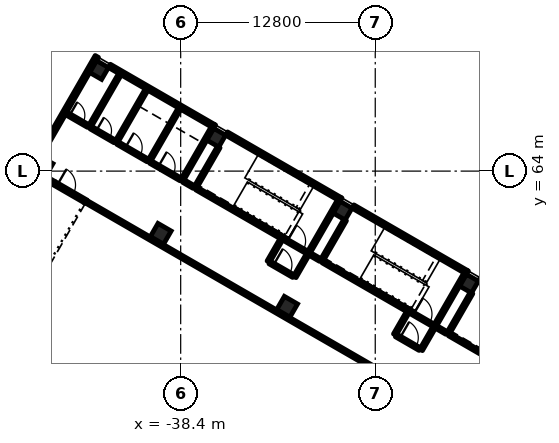
"""IFC4 building model, lengths in metres.
Left out: names, types, materials, properties, quantities, classifications, styles, units other than length and angle.
Written with IfcOpenShell. Run it as: python <this file> out.ifc"""

import sys

from ifc_helpers import new_model, si_unit, direction, frame, frame_2d, origin, origin_2d, place, context, subcontext, project, spatial, rectangle, extrude, element, fill, save


model = new_model("IFC4")
c1 = context("Model", 3, precision=1e-05, world=origin(), true_north=direction((0.0, 1.0)))
c2 = subcontext(c1, "Body", "Model", "MODEL_VIEW")
j1 = project(units=[si_unit("LENGTHUNIT", "METRE"), si_unit("PLANEANGLEUNIT", "RADIAN")], contexts=[c1])
p1 = place(None, origin())
s1 = spatial("IfcSite", under=j1, at=p1, CompositionType="ELEMENT")
p2 = place(p1, origin())
s2 = spatial("IfcBuilding", under=s1, at=p2, CompositionType="ELEMENT")
p3 = place(p2, frame((0.0, 0.0, 11.4)))
s3 = spatial("IfcBuildingStorey", under=s2, at=p3, CompositionType="ELEMENT", Elevation=11.4)
for number, where, z_axis, x_axis in (
    (1, (-19.432, 56.599, 0.0), (0.0, 0.0, 1.0), (-0.5, -0.866, 0.0)),
    (2, (-27.746, 61.399, 0.0), (0.0, 0.0, 1.0), (-0.5, -0.866, 0.0)),
    (3, (-36.06, 66.199, 0.0), (0.0, 0.0, 1.0), (-0.5, -0.866, 0.0)),
    (4, (-43.767, 70.649, 0.0), (0.0, 0.0, 1.0), (-0.5, -0.866, 0.0)),
):
    element("IfcColumn", number, at=place(p3, frame(where, z_axis=z_axis, x_axis=x_axis)), inside=s3, PredefinedType="COLUMN", context=c2, shape_type="SweptSolid", body=[
        extrude(rectangle(XDim=0.9, YDim=0.9, at=origin_2d()), origin(), (0.0, 0.0, 1.0), 4.8),
    ])
for number, where, z_axis, x_axis in (
    (5, (-31.396, 55.077, 0.0), (0.0, 0.0, 1.0), (-0.5, -0.866, 0.0)),
    (6, (-39.71, 59.877, 0.0), (0.0, 0.0, 1.0), (-0.5, -0.866, 0.0)),
):
    element("IfcColumn", number, at=place(p3, frame(where, z_axis=z_axis, x_axis=x_axis)), inside=s3, PredefinedType="COLUMN", context=c2, shape_type="SweptSolid", body=[
        extrude(rectangle(XDim=1.0, YDim=1.0, at=origin_2d()), origin(), (0.0, 0.0, 1.0), 4.8),
    ])
p4 = place(p3, frame((-47.417, 64.327, 0.0), z_axis=(0.0, 0.0, 1.0), x_axis=(-0.5, -0.866025403784, 0.0)))
e7 = element("IfcColumn", 7, at=p4, inside=s3, PredefinedType="COLUMN", context=c2, shape_type="SweptSolid", body=[
    extrude(rectangle(XDim=0.9, YDim=0.9, at=origin_2d()), origin(), (0.0, 0.0, 1.0), 4.8),
])
p5 = place(p3, frame((-49.071, 62.612, 0.0), z_axis=(0.0, 0.0, 1.0), x_axis=(0.500001855621, 0.866024332438, 0.0)))
e8 = element("IfcWall", 8, at=p5, inside=s3, PredefinedType="SOLIDWALL", context=c2, shape_type="SweptSolid", body=[
    extrude(rectangle(XDim=10.312, YDim=0.25, at=frame_2d((5.156, 0.0))), origin(), (0.0, 0.0, 1.0), 4.5),
])
p6 = place(p3, frame((-18.755, 56.872, 0.0), z_axis=(0.0, 0.0, 1.0), x_axis=(0.866034667978, -0.499983953603, 0.0)))
e9 = element("IfcWall", 9, at=p6, inside=s3, PredefinedType="SOLIDWALL", context=c2, shape_type="SweptSolid", body=[
    extrude(rectangle(XDim=9.725, YDim=0.25, at=frame_2d((4.862, 0.0))), origin(), (0.0, 0.0, 1.0), 4.5),
])
p7 = place(p3, frame((-27.069, 61.672, 0.0), z_axis=(0.0, 0.0, 1.0), x_axis=(0.866021068297, -0.500007509209, 0.0)))
e10 = element("IfcWall", 10, at=p7, inside=s3, PredefinedType="SOLIDWALL", context=c2, shape_type="SweptSolid", body=[
    extrude(rectangle(XDim=8.6, YDim=0.25, at=frame_2d((4.3, 0.0))), origin(), (0.0, 0.0, 1.0), 4.5),
])
p8 = place(p3, frame((-35.383, 66.472, 0.0), z_axis=(0.0, 0.0, 1.0), x_axis=(0.866028165386, -0.499995216735, 0.0)))
e11 = element("IfcWall", 11, at=p8, inside=s3, PredefinedType="SOLIDWALL", context=c2, shape_type="SweptSolid", body=[
    extrude(rectangle(XDim=8.6, YDim=0.25, at=frame_2d((4.3, 0.0))), origin(), (0.0, 0.0, 1.0), 4.5),
])
p9 = place(p3, frame((-43.09, 70.922, 0.0), z_axis=(0.0, 0.0, 1.0), x_axis=(0.866026562566, -0.499997992926, 0.0)))
e12 = element("IfcWall", 12, at=p9, inside=s3, PredefinedType="SOLIDWALL", context=c2, shape_type="SweptSolid", body=[
    extrude(rectangle(XDim=7.9, YDim=0.25, at=frame_2d((3.95, 0.0))), origin(), (0.0, 0.0, 1.0), 4.5),
])
p10 = place(p3, frame((-19.621, 57.372, 0.0), z_axis=(0.0, 0.0, 1.0), x_axis=(0.867038199201, -0.4982416694, 0.0)))
e13 = element("IfcWall", 13, at=p10, inside=s3, PredefinedType="SOLIDWALL", context=c2, shape_type="SweptSolid", body=[
    extrude(rectangle(XDim=0.1, YDim=0.25, at=frame_2d((0.05, 0.0))), origin(), (0.0, 0.0, 1.0), 4.5),
])
for number, where, z_axis, x_axis in (
    (14, (-27.935, 62.172, 0.0), (0.0, 0.0, 1.0), (0.866, -0.5, 0.0)),
    (15, (-36.249, 66.972, 0.0), (0.0, 0.0, 1.0), (0.866, -0.5, 0.0)),
):
    element("IfcWall", number, at=place(p3, frame(where, z_axis=z_axis, x_axis=x_axis)), inside=s3, PredefinedType="SOLIDWALL", context=c2, shape_type="SweptSolid", body=[
        extrude(rectangle(XDim=0.1, YDim=0.25, at=frame_2d((0.05, 0.0))), origin(), (0.0, 0.0, 1.0), 4.5),
    ])
p11 = place(p3, frame((-19.267, 55.984, 0.0), z_axis=(0.0, 0.0, 1.0), x_axis=(-0.49999285859, -0.86602952684, 0.0)))
e16 = element("IfcWall", 16, at=p11, inside=s3, PredefinedType="SOLIDWALL", context=c2, shape_type="SweptSolid", body=[
    extrude(rectangle(XDim=3.1, YDim=0.2, at=frame_2d((1.55, 0.0))), origin(), (0.0, 0.0, 1.0), 4.5),
])
p12 = place(p3, frame((-19.683, 57.263, 0.0), z_axis=(0.0, 0.0, 1.0), x_axis=(-0.49999894854, -0.866026010844, 0.0)))
e17 = element("IfcWall", 17, at=p12, inside=s3, PredefinedType="SOLIDWALL", context=c2, shape_type="SweptSolid", body=[
    extrude(rectangle(XDim=4.0, YDim=0.2, at=frame_2d((2.0, 0.0))), origin(), (0.0, 0.0, 1.0), 4.5),
])
p13 = place(p3, frame((-27.581, 60.784, 0.0), z_axis=(0.0, 0.0, 1.0), x_axis=(-0.49999285859, -0.86602952684, 0.0)))
e18 = element("IfcWall", 18, at=p13, inside=s3, PredefinedType="SOLIDWALL", context=c2, shape_type="SweptSolid", body=[
    extrude(rectangle(XDim=3.1, YDim=0.2, at=frame_2d((1.55, 0.0))), origin(), (0.0, 0.0, 1.0), 4.5),
])
p14 = place(p3, frame((-27.997, 62.063, 0.0), z_axis=(0.0, 0.0, 1.0), x_axis=(-0.49999894854, -0.866026010844, 0.0)))
e19 = element("IfcWall", 19, at=p14, inside=s3, PredefinedType="SOLIDWALL", context=c2, shape_type="SweptSolid", body=[
    extrude(rectangle(XDim=4.0, YDim=0.2, at=frame_2d((2.0, 0.0))), origin(), (0.0, 0.0, 1.0), 4.5),
])
p15 = place(p3, frame((-35.895, 65.584, 0.0), z_axis=(0.0, 0.0, 1.0), x_axis=(-0.500026960575, -0.86600983753, 0.0)))
e20 = element("IfcWall", 20, at=p15, inside=s3, PredefinedType="SOLIDWALL", context=c2, shape_type="SweptSolid", body=[
    extrude(rectangle(XDim=3.1, YDim=0.2, at=frame_2d((1.55, 0.0))), origin(), (0.0, 0.0, 1.0), 4.5),
])
p16 = place(p3, frame((-14.972, 49.924, 0.0), z_axis=(0.0, 0.0, 1.0), x_axis=(-0.86601134256, 0.500024353964, 0.0)))
e21 = element("IfcWall", 21, at=p16, inside=s3, PredefinedType="SOLIDWALL", context=c2, shape_type="SweptSolid", body=[
    extrude(rectangle(XDim=6.65, YDim=0.2, at=frame_2d((3.325, 0.0))), origin(), (0.0, 0.0, 1.0), 4.5),
])
p17 = place(p3, frame((-23.285, 54.724, 0.0), z_axis=(0.0, 0.0, 1.0), x_axis=(0.866002029911, -0.500040482552, 0.0)))
e22 = element("IfcWall", 22, at=p17, inside=s3, PredefinedType="SOLIDWALL", context=c2, shape_type="SweptSolid", body=[
    extrude(rectangle(XDim=1.75, YDim=0.2, at=frame_2d((0.875, 0.0))), origin(), (0.0, 0.0, 1.0), 4.5),
])
p18 = place(p17, frame((0.25, 0.0, 0.0)))
e23 = element("IfcOpeningElement", 23, at=p18, cuts=e22, PredefinedType="OPENING", context=c2, shape_type="SweptSolid", body=[
    extrude(rectangle(XDim=1.2, YDim=2.1, at=frame_2d((0.6, 1.05))), frame((0.0, 0.11, 0.0), z_axis=(0.0, -1.0, 0.0), x_axis=(1.0, 0.0, 0.0)), (0.0, 0.0, 1.0), 0.22),
])
p19 = place(p3, frame((-23.285, 54.724, 0.0), z_axis=(0.0, 0.0, 1.0), x_axis=(-0.866027239912, 0.49999681972, 0.0)))
e24 = element("IfcWall", 24, at=p19, inside=s3, PredefinedType="SOLIDWALL", context=c2, shape_type="SweptSolid", body=[
    extrude(rectangle(XDim=6.65, YDim=0.2, at=frame_2d((3.325, 0.0))), origin(), (0.0, 0.0, 1.0), 4.5),
])
p20 = place(p3, frame((-31.599, 59.524, 0.0), z_axis=(0.0, 0.0, 1.0), x_axis=(0.866036909293, -0.499980071345, 0.0)))
e25 = element("IfcWall", 25, at=p20, inside=s3, PredefinedType="SOLIDWALL", context=c2, shape_type="SweptSolid", body=[
    extrude(rectangle(XDim=1.75, YDim=0.2, at=frame_2d((0.875, 0.0))), origin(), (0.0, 0.0, 1.0), 4.5),
])
p21 = place(p20, frame((0.25, 0.0, 0.0)))
e26 = element("IfcOpeningElement", 26, at=p21, cuts=e25, PredefinedType="OPENING", context=c2, shape_type="SweptSolid", body=[
    extrude(rectangle(XDim=1.2, YDim=2.1, at=frame_2d((0.6, 1.05))), frame((0.0, 0.11, 0.0), z_axis=(0.0, -1.0, 0.0), x_axis=(1.0, 0.0, 0.0)), (0.0, 0.0, 1.0), 0.22),
])
p22 = place(p3, frame((-31.599, 59.524, 0.0), z_axis=(0.0, 0.0, 1.0), x_axis=(-0.866027239912, 0.49999681972, 0.0)))
e27 = element("IfcWall", 27, at=p22, inside=s3, PredefinedType="SOLIDWALL", context=c2, shape_type="SweptSolid", body=[
    extrude(rectangle(XDim=6.65, YDim=0.2, at=frame_2d((3.325, 0.0))), origin(), (0.0, 0.0, 1.0), 4.5),
])
for number, where, z_axis, x_axis in (
    (28, (-36.311, 66.864, 0.0), (0.0, 0.0, 1.0), (-0.5, -0.866, 0.0)),
    (29, (-38.476, 68.114, 0.0), (0.0, 0.0, 1.0), (-0.5, -0.866, 0.0)),
    (30, (-40.641, 69.364, 0.0), (0.0, 0.0, 1.0), (-0.5, -0.866, 0.0)),
):
    element("IfcWall", number, at=place(p3, frame(where, z_axis=z_axis, x_axis=x_axis)), inside=s3, PredefinedType="SOLIDWALL", context=c2, shape_type="SweptSolid", body=[
        extrude(rectangle(XDim=4.0, YDim=0.2, at=frame_2d((2.0, 0.0))), origin(), (0.0, 0.0, 1.0), 4.5),
    ])
p23 = place(p3, frame((-40.389, 64.599, 0.0), z_axis=(0.0, 0.0, 1.0), x_axis=(0.86602648383, -0.499998129301, 0.0)))
e31 = element("IfcWall", 31, at=p23, inside=s3, PredefinedType="SOLIDWALL", context=c2, shape_type="SweptSolid", body=[
    extrude(rectangle(XDim=2.3, YDim=0.2, at=frame_2d((1.15, 0.0))), origin(), (0.0, 0.0, 1.0), 4.5),
])
p24 = place(p23, frame((0.6, 0.0, 0.0)))
e32 = element("IfcOpeningElement", 32, at=p24, cuts=e31, PredefinedType="OPENING", context=c2, shape_type="SweptSolid", body=[
    extrude(rectangle(XDim=1.1, YDim=2.1, at=frame_2d((0.55, 1.05))), frame((0.0, 0.11, 0.0), z_axis=(0.0, -1.0, 0.0), x_axis=(1.0, 0.0, 0.0)), (0.0, 0.0, 1.0), 0.22),
])
p25 = place(p3, frame((-42.554, 65.849, 0.0), z_axis=(0.0, 0.0, 1.0), x_axis=(0.86602648383, -0.499998129301, 0.0)))
e33 = element("IfcWall", 33, at=p25, inside=s3, PredefinedType="SOLIDWALL", context=c2, shape_type="SweptSolid", body=[
    extrude(rectangle(XDim=2.3, YDim=0.2, at=frame_2d((1.15, 0.0))), origin(), (0.0, 0.0, 1.0), 4.5),
])
p26 = place(p25, frame((0.6, 0.0, 0.0)))
e34 = element("IfcOpeningElement", 34, at=p26, cuts=e33, PredefinedType="OPENING", context=c2, shape_type="SweptSolid", body=[
    extrude(rectangle(XDim=1.1, YDim=2.1, at=frame_2d((0.55, 1.05))), frame((0.0, 0.11, 0.0), z_axis=(0.0, -1.0, 0.0), x_axis=(1.0, 0.0, 0.0)), (0.0, 0.0, 1.0), 0.22),
])
p27 = place(p3, frame((-21.733, 53.713, 0.0), z_axis=(0.0, 0.0, 1.0), x_axis=(-0.499892348375, -0.866087547558, 0.0)))
e35 = element("IfcWall", 35, at=p27, inside=s3, PredefinedType="PARTITIONING", context=c2, shape_type="SweptSolid", body=[
    extrude(rectangle(XDim=1.7, YDim=0.2, at=frame_2d((0.85, 0.0))), origin(), (0.0, 0.0, 1.0), 3.9),
])
p28 = place(p3, frame((-23.465, 54.713, 0.0), z_axis=(0.0, 0.0, 1.0), x_axis=(-0.500000056704, -0.866025371046, 0.0)))
e36 = element("IfcWall", 36, at=p28, inside=s3, PredefinedType="PARTITIONING", context=c2, shape_type="SweptSolid", body=[
    extrude(rectangle(XDim=1.7, YDim=0.2, at=frame_2d((0.85, 0.0))), origin(), (0.0, 0.0, 1.0), 3.9),
])
for number, where, z_axis, x_axis in (
    (37, (-30.047, 58.513, 0.0), (0.0, 0.0, 1.0), (-0.5, -0.866, 0.0)),
    (38, (-31.779, 59.513, 0.0), (0.0, 0.0, 1.0), (-0.5, -0.866, 0.0)),
):
    element("IfcWall", number, at=place(p3, frame(where, z_axis=z_axis, x_axis=x_axis)), inside=s3, PredefinedType="PARTITIONING", context=c2, shape_type="SweptSolid", body=[
        extrude(rectangle(XDim=1.7, YDim=0.2, at=frame_2d((0.85, 0.0))), origin(), (0.0, 0.0, 1.0), 3.9),
    ])
p29 = place(p3, frame((-24.229, 53.19, 0.0), z_axis=(0.0, 0.0, 1.0), x_axis=(0.866047807691, -0.499961193289, 0.0)))
e39 = element("IfcWall", 39, at=p29, inside=s3, PredefinedType="PARTITIONING", context=c2, shape_type="SweptSolid", body=[
    extrude(rectangle(XDim=1.8, YDim=0.2, at=frame_2d((0.9, 0.0))), origin(), (0.0, 0.0, 1.0), 3.9),
])
p30 = place(p29, frame((0.3, 0.0, 0.0)))
e40 = element("IfcOpeningElement", 40, at=p30, cuts=e39, PredefinedType="OPENING", context=c2, shape_type="SweptSolid", body=[
    extrude(rectangle(XDim=1.2, YDim=2.1, at=frame_2d((0.6, 1.05))), frame((0.0, 0.11, 0.0), z_axis=(0.0, -1.0, 0.0), x_axis=(1.0, 0.0, 0.0)), (0.0, 0.0, 1.0), 0.22),
])
p31 = place(p3, frame((-32.542, 57.99, 0.0), z_axis=(0.0, 0.0, 1.0), x_axis=(0.866047807691, -0.499961193289, 0.0)))
e41 = element("IfcWall", 41, at=p31, inside=s3, PredefinedType="PARTITIONING", context=c2, shape_type="SweptSolid", body=[
    extrude(rectangle(XDim=1.8, YDim=0.2, at=frame_2d((0.9, 0.0))), origin(), (0.0, 0.0, 1.0), 3.9),
])
p32 = place(p31, frame((0.3, 0.0, 0.0)))
e42 = element("IfcOpeningElement", 42, at=p32, cuts=e41, PredefinedType="OPENING", context=c2, shape_type="SweptSolid", body=[
    extrude(rectangle(XDim=1.2, YDim=2.1, at=frame_2d((0.6, 1.05))), frame((0.0, 0.11, 0.0), z_axis=(0.0, -1.0, 0.0), x_axis=(1.0, 0.0, 0.0)), (0.0, 0.0, 1.0), 0.22),
])
p33 = place(p3, frame((-46.734, 63.21, 0.0), z_axis=(0.0, 0.0, 1.0), x_axis=(0.866057815567, -0.499943856944, 0.0)))
e43 = element("IfcWall", 43, at=p33, inside=s3, PredefinedType="SOLIDWALL", context=c2, shape_type="SweptSolid", body=[
    extrude(rectangle(XDim=2.45, YDim=0.25, at=frame_2d((1.225, 0.0))), origin(), (0.0, 0.0, 1.0), 3.9),
])
p34 = place(p33, frame((0.25, 0.0, 0.0)))
e44 = element("IfcOpeningElement", 44, at=p34, cuts=e43, PredefinedType="OPENING", context=c2, shape_type="SweptSolid", body=[
    extrude(rectangle(XDim=1.2, YDim=2.1, at=frame_2d((0.6, 1.05))), frame((0.0, 0.135, 0.0), z_axis=(0.0, -1.0, 0.0), x_axis=(1.0, 0.0, 0.0)), (0.0, 0.0, 1.0), 0.27),
])
p35 = place(p3, frame((-46.734, 63.21, 0.0), z_axis=(0.0, 0.0, 1.0), x_axis=(-0.865989903783, 0.500061482766, 0.0)))
e45 = element("IfcWall", 45, at=p35, inside=s3, PredefinedType="SOLIDWALL", context=c2, shape_type="SweptSolid", body=[
    extrude(rectangle(XDim=1.6, YDim=0.25, at=frame_2d((0.8, 0.0))), origin(), (0.0, 0.0, 1.0), 3.9),
])
p36 = place(p3, frame((-42.395, 70.376, 0.0), z_axis=(0.0, 0.0, 1.0), x_axis=(-0.49999894854, -0.866026010844, 0.0)))
e46 = element("IfcWall", 46, at=p36, inside=s3, PredefinedType="PARTITIONING", context=c2, shape_type="SweptSolid", body=[
    extrude(rectangle(XDim=4.0, YDim=0.2, at=frame_2d((2.0, 0.0))), origin(), (0.0, 0.0, 1.0), 3.9),
])
p37 = place(p3, frame((-44.308, 66.862, 0.0), z_axis=(0.0, 0.0, 1.0), x_axis=(0.866036312054, -0.499981105847, 0.0)))
e47 = element("IfcWall", 47, at=p37, inside=s3, PredefinedType="PARTITIONING", context=c2, shape_type="SweptSolid", body=[
    extrude(rectangle(XDim=1.825, YDim=0.2, at=frame_2d((0.912, 0.0))), origin(), (0.0, 0.0, 1.0), 3.9),
])
p38 = place(p37, frame((0.413, 0.0, 0.0)))
e48 = element("IfcOpeningElement", 48, at=p38, cuts=e47, PredefinedType="OPENING", context=c2, shape_type="SweptSolid", body=[
    extrude(rectangle(XDim=1.0, YDim=2.1, at=frame_2d((0.5, 1.05))), frame((0.0, 0.11, 0.0), z_axis=(0.0, -1.0, 0.0), x_axis=(1.0, 0.0, 0.0)), (0.0, 0.0, 1.0), 0.22),
])
p39 = place(p3, frame((-45.932, 67.799, 0.0), z_axis=(0.0, 0.0, 1.0), x_axis=(0.866027799164, -0.499995851058, 0.0)))
e49 = element("IfcWall", 49, at=p39, inside=s3, PredefinedType="PARTITIONING", context=c2, shape_type="SweptSolid", body=[
    extrude(rectangle(XDim=1.675, YDim=0.2, at=frame_2d((0.837, 0.0))), origin(), (0.0, 0.0, 1.0), 3.9),
])
p40 = place(p39, frame((0.262, 0.0, 0.0)))
e50 = element("IfcOpeningElement", 50, at=p40, cuts=e49, PredefinedType="OPENING", context=c2, shape_type="SweptSolid", body=[
    extrude(rectangle(XDim=1.0, YDim=2.1, at=frame_2d((0.5, 1.05))), frame((0.0, 0.11, 0.0), z_axis=(0.0, -1.0, 0.0), x_axis=(1.0, 0.0, 0.0)), (0.0, 0.0, 1.0), 0.22),
])
p41 = place(p3, frame((-20.904, 53.349, 0.0), z_axis=(0.0, 0.0, 1.0), x_axis=(-0.865961984968, 0.500109828528, 0.0)))
e51 = element("IfcWall", 51, at=p41, inside=s3, PredefinedType="PARTITIONING", context=c2, shape_type="SweptSolid", body=[
    extrude(rectangle(XDim=0.8, YDim=0.2, at=frame_2d((0.4, 0.0))), origin(), (0.0, 0.0, 1.0), 3.9),
])
p42 = place(p3, frame((-29.218, 58.149, 0.0), z_axis=(0.0, 0.0, 1.0), x_axis=(-0.866017831539, 0.500013115284, 0.0)))
e52 = element("IfcWall", 52, at=p42, inside=s3, PredefinedType="PARTITIONING", context=c2, shape_type="SweptSolid", body=[
    extrude(rectangle(XDim=0.8, YDim=0.2, at=frame_2d((0.4, 0.0))), origin(), (0.0, 0.0, 1.0), 3.9),
])
p43 = place(p3, frame((-37.531, 62.949, 0.0), z_axis=(0.0, 0.0, 1.0), x_axis=(-0.866094119867, 0.499880961361, 0.0)))
e53 = element("IfcWall", 53, at=p43, inside=s3, PredefinedType="PARTITIONING", context=c2, shape_type="SweptSolid", body=[
    extrude(rectangle(XDim=0.8, YDim=0.2, at=frame_2d((0.4, 0.0))), origin(), (0.0, 0.0, 1.0), 3.9),
])
p44 = place(p3, frame((-10.491, 42.285, 0.0), z_axis=(0.0, 0.0, 1.0), x_axis=(-0.866022857395, 0.50000441045, 0.0)))
e54 = element("IfcWall", 54, at=p44, inside=s3, PredefinedType="PARTITIONING", context=c2, shape_type="SweptSolid", body=[
    extrude(rectangle(XDim=39.4, YDim=0.2, at=frame_2d((19.7, 0.0))), origin(), (0.0, 0.0, 1.0), 3.9),
])
p45 = place(p18, origin())
e55 = element("IfcDoor", 55, at=p45, inside=s3, OperationType="SINGLE_SWING_LEFT", PredefinedType="DOOR", context=c2, shape_type="SweptSolid", body=[
    extrude(rectangle(XDim=1.2, YDim=2.1, at=frame_2d((0.6, 1.05))), frame((0.0, 0.025, 0.0), z_axis=(0.0, -1.0, 0.0), x_axis=(1.0, 0.0, 0.0)), (0.0, 0.0, 1.0), 0.05),
])
fill(e23, e55)
p46 = place(p21, origin())
e56 = element("IfcDoor", 56, at=p46, inside=s3, OperationType="SINGLE_SWING_LEFT", PredefinedType="DOOR", context=c2, shape_type="SweptSolid", body=[
    extrude(rectangle(XDim=1.2, YDim=2.1, at=frame_2d((0.6, 1.05))), frame((0.0, 0.025, 0.0), z_axis=(0.0, -1.0, 0.0), x_axis=(1.0, 0.0, 0.0)), (0.0, 0.0, 1.0), 0.05),
])
fill(e26, e56)
p47 = place(p24, origin())
e57 = element("IfcDoor", 57, at=p47, inside=s3, OperationType="DOUBLE_DOOR_SLIDING", PredefinedType="DOOR", context=c2, shape_type="SweptSolid", body=[
    extrude(rectangle(XDim=1.1, YDim=2.1, at=frame_2d((0.55, 1.05))), frame((0.0, 0.025, 0.0), z_axis=(0.0, -1.0, 0.0), x_axis=(1.0, 0.0, 0.0)), (0.0, 0.0, 1.0), 0.05),
])
fill(e32, e57)
p48 = place(p26, origin())
e58 = element("IfcDoor", 58, at=p48, inside=s3, OperationType="DOUBLE_DOOR_SLIDING", PredefinedType="DOOR", context=c2, shape_type="SweptSolid", body=[
    extrude(rectangle(XDim=1.1, YDim=2.1, at=frame_2d((0.55, 1.05))), frame((0.0, 0.025, 0.0), z_axis=(0.0, -1.0, 0.0), x_axis=(1.0, 0.0, 0.0)), (0.0, 0.0, 1.0), 0.05),
])
fill(e34, e58)
p49 = place(p30, origin())
e59 = element("IfcDoor", 59, at=p49, inside=s3, OperationType="SINGLE_SWING_LEFT", PredefinedType="DOOR", context=c2, shape_type="SweptSolid", body=[
    extrude(rectangle(XDim=1.2, YDim=2.1, at=frame_2d((0.6, 1.05))), frame((0.0, 0.025, 0.0), z_axis=(0.0, -1.0, 0.0), x_axis=(1.0, 0.0, 0.0)), (0.0, 0.0, 1.0), 0.05),
])
fill(e40, e59)
p50 = place(p32, origin())
e60 = element("IfcDoor", 60, at=p50, inside=s3, OperationType="SINGLE_SWING_LEFT", PredefinedType="DOOR", context=c2, shape_type="SweptSolid", body=[
    extrude(rectangle(XDim=1.2, YDim=2.1, at=frame_2d((0.6, 1.05))), frame((0.0, 0.025, 0.0), z_axis=(0.0, -1.0, 0.0), x_axis=(1.0, 0.0, 0.0)), (0.0, 0.0, 1.0), 0.05),
])
fill(e42, e60)
p51 = place(p34, origin())
e61 = element("IfcDoor", 61, at=p51, inside=s3, OperationType="SINGLE_SWING_LEFT", PredefinedType="DOOR", context=c2, shape_type="SweptSolid", body=[
    extrude(rectangle(XDim=1.2, YDim=2.1, at=frame_2d((0.6, 1.05))), frame((0.0, 0.025, 0.0), z_axis=(0.0, -1.0, 0.0), x_axis=(1.0, 0.0, 0.0)), (0.0, 0.0, 1.0), 0.05),
])
fill(e44, e61)
p52 = place(p38, origin())
e62 = element("IfcDoor", 62, at=p52, inside=s3, OperationType="SINGLE_SWING_LEFT", PredefinedType="DOOR", context=c2, shape_type="SweptSolid", body=[
    extrude(rectangle(XDim=1.0, YDim=2.1, at=frame_2d((0.5, 1.05))), frame((0.0, 0.025, 0.0), z_axis=(0.0, -1.0, 0.0), x_axis=(1.0, 0.0, 0.0)), (0.0, 0.0, 1.0), 0.05),
])
fill(e48, e62)
p53 = place(p40, origin())
e63 = element("IfcDoor", 63, at=p53, inside=s3, OperationType="SINGLE_SWING_LEFT", PredefinedType="DOOR", context=c2, shape_type="SweptSolid", body=[
    extrude(rectangle(XDim=1.0, YDim=2.1, at=frame_2d((0.5, 1.05))), frame((0.0, 0.025, 0.0), z_axis=(0.0, -1.0, 0.0), x_axis=(1.0, 0.0, 0.0)), (0.0, 0.0, 1.0), 0.05),
])
fill(e50, e63)
save(model, sys.argv[1])
